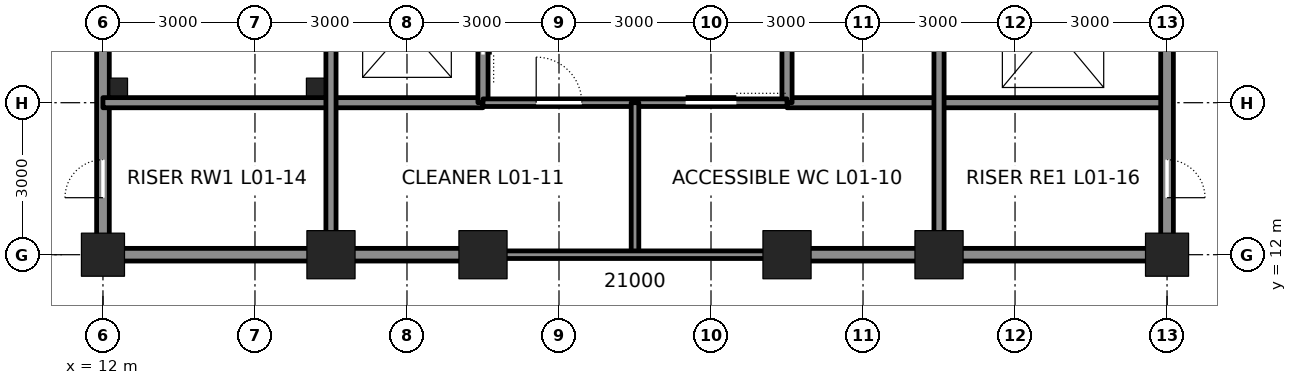
"""IFC4 building model, lengths in metres.
Left out: names, types, materials, properties, quantities, classifications, styles, units other than length and angle.
Written with IfcOpenShell. Run it as: python <this file> out.ifc"""

import sys

from ifc_helpers import new_model, si_unit, direction, frame, frame_2d, origin, origin_2d, place, context, subcontext, project, spatial, rectangle, hollow_rectangle, extrude, element, fill, save


model = new_model("IFC4")
c1 = context("Model", 3, precision=1e-05, world=origin(), true_north=direction((0.0, 1.0)))
c2 = subcontext(c1, "Body", "Model", "MODEL_VIEW")
j1 = project(units=[si_unit("LENGTHUNIT", "METRE"), si_unit("PLANEANGLEUNIT", "RADIAN")], contexts=[c1])
p1 = place(None, origin())
s1 = spatial("IfcSite", under=j1, at=p1, CompositionType="ELEMENT")
p2 = place(p1, origin())
s2 = spatial("IfcBuilding", under=s1, at=p2, CompositionType="ELEMENT")
p3 = place(p2, frame((0.0, 0.0, 6.0)))
s3 = spatial("IfcBuildingStorey", under=s2, at=p3, CompositionType="ELEMENT", Elevation=6.0)
p4 = place(p3, frame((12.0, 12.0, 0.0), z_axis=(0.0, 0.0, 1.0), x_axis=(1.0, 0.0, 0.0)))
e1 = element("IfcColumn", 1, at=p4, inside=s3, PredefinedType="COLUMN", context=c2, shape_type="SweptSolid", body=[
    extrude(hollow_rectangle(XDim=0.85, YDim=0.85, WallThickness=0.085, at=origin_2d()), origin(), (0.0, 0.0, 1.0), 7.5),
])
for number, where, z_axis, x_axis in (
    (2, (16.5, 12.0, 0.0), (0.0, 0.0, 1.0), (1.0, 0.0, 0.0)),
    (3, (19.5, 12.0, 0.0), (0.0, 0.0, 1.0), (1.0, 0.0, 0.0)),
    (4, (25.5, 12.0, 0.0), (0.0, 0.0, 1.0), (1.0, 0.0, 0.0)),
    (5, (28.5, 12.0, 0.0), (0.0, 0.0, 1.0), (1.0, 0.0, 0.0)),
):
    element("IfcColumn", number, at=place(p3, frame(where, z_axis=z_axis, x_axis=x_axis)), inside=s3, PredefinedType="COLUMN", context=c2, shape_type="SweptSolid", body=[
        extrude(hollow_rectangle(XDim=0.95, YDim=0.95, WallThickness=0.095, at=origin_2d()), origin(), (0.0, 0.0, 1.0), 7.5),
    ])
p5 = place(p3, frame((33.0, 12.0, 0.0), z_axis=(0.0, 0.0, 1.0), x_axis=(1.0, 0.0, 0.0)))
e6 = element("IfcColumn", 6, at=p5, inside=s3, PredefinedType="COLUMN", context=c2, shape_type="SweptSolid", body=[
    extrude(hollow_rectangle(XDim=0.85, YDim=0.85, WallThickness=0.085, at=origin_2d()), origin(), (0.0, 0.0, 1.0), 7.5),
])
p6 = place(p3, frame((12.0, 12.25, 0.0), z_axis=(0.0, 0.0, 1.0), x_axis=(0.0, 1.0, 0.0)))
e7 = element("IfcWall", 7, at=p6, inside=s3, PredefinedType="SOLIDWALL", context=c2, shape_type="SweptSolid", body=[
    extrude(rectangle(XDim=8.5, YDim=0.25, at=frame_2d((4.25, 0.0))), origin(), (0.0, 0.0, 1.0), 6.373),
])
p7 = place(p6, frame((0.875, 0.0, 0.0)))
e8 = element("IfcOpeningElement", 8, at=p7, cuts=e7, PredefinedType="OPENING", context=c2, shape_type="SweptSolid", body=[
    extrude(rectangle(XDim=0.75, YDim=2.1, at=frame_2d((0.375, 1.05))), frame((0.0, 0.135, 0.0), z_axis=(0.0, -1.0, 0.0), x_axis=(1.0, 0.0, 0.0)), (0.0, 0.0, 1.0), 0.27),
])
p8 = place(p3, frame((12.25, 12.0, 0.0), z_axis=(0.0, 0.0, 1.0), x_axis=(1.0, 0.0, 0.0)))
e9 = element("IfcWall", 9, at=p8, inside=s3, PredefinedType="SOLIDWALL", context=c2, shape_type="SweptSolid", body=[
    extrude(rectangle(XDim=4.0, YDim=0.25, at=frame_2d((2.0, 0.0))), origin(), (0.0, 0.0, 1.0), 6.441),
])
for number, where, z_axis, x_axis in (
    (10, (16.75, 12.0, 0.0), (0.0, 0.0, 1.0), (1.0, 0.0, 0.0)),
    (11, (25.75, 12.0, 0.0), (0.0, 0.0, 1.0), (1.0, 0.0, 0.0)),
):
    element("IfcWall", number, at=place(p3, frame(where, z_axis=z_axis, x_axis=x_axis)), inside=s3, PredefinedType="SOLIDWALL", context=c2, shape_type="SweptSolid", body=[
        extrude(rectangle(XDim=2.5, YDim=0.25, at=frame_2d((1.25, 0.0))), origin(), (0.0, 0.0, 1.0), 6.441),
    ])
p9 = place(p3, frame((28.75, 12.0, 0.0), z_axis=(0.0, 0.0, 1.0), x_axis=(1.0, 0.0, 0.0)))
e12 = element("IfcWall", 12, at=p9, inside=s3, PredefinedType="SOLIDWALL", context=c2, shape_type="SweptSolid", body=[
    extrude(rectangle(XDim=4.0, YDim=0.25, at=frame_2d((2.0, 0.0))), origin(), (0.0, 0.0, 1.0), 6.441),
])
for number, where, z_axis, x_axis in (
    (13, (12.0, 15.0, 0.0), (0.0, 0.0, 1.0), (1.0, 0.0, 0.0)),
    (14, (25.5, 15.0, 0.0), (0.0, 0.0, 1.0), (1.0, 0.0, 0.0)),
):
    element("IfcWall", number, at=place(p3, frame(where, z_axis=z_axis, x_axis=x_axis)), inside=s3, PredefinedType="SOLIDWALL", context=c2, shape_type="SweptSolid", body=[
        extrude(rectangle(XDim=7.5, YDim=0.2, at=frame_2d((3.75, 0.0))), origin(), (0.0, 0.0, 1.0), 7.3),
    ])
p10 = place(p3, frame((16.5, 12.25, 0.0), z_axis=(0.0, 0.0, 1.0), x_axis=(0.0, 1.0, 0.0)))
e15 = element("IfcWall", 15, at=p10, inside=s3, PredefinedType="SOLIDWALL", context=c2, shape_type="SweptSolid", body=[
    extrude(rectangle(XDim=8.5, YDim=0.2, at=frame_2d((4.25, 0.0))), origin(), (0.0, 0.0, 1.0), 6.373),
])
p11 = place(p3, frame((19.5, 15.0, 0.0), z_axis=(0.0, 0.0, 1.0), x_axis=(0.0, 1.0, 0.0)))
e16 = element("IfcWall", 16, at=p11, inside=s3, PredefinedType="SOLIDWALL", context=c2, shape_type="SweptSolid", body=[
    extrude(rectangle(XDim=12.0, YDim=0.2, at=frame_2d((6.0, 0.0))), origin(), (0.0, 0.0, 1.0), 6.325),
])
p12 = place(p11, frame((0.95, 0.0, 0.0)))
e17 = element("IfcOpeningElement", 17, at=p12, cuts=e16, PredefinedType="OPENING", context=c2, shape_type="SweptSolid", body=[
    extrude(rectangle(XDim=1.1, YDim=2.1, at=frame_2d((0.55, 1.05))), frame((0.0, 0.11, 0.0), z_axis=(0.0, -1.0, 0.0), x_axis=(1.0, 0.0, 0.0)), (0.0, 0.0, 1.0), 0.22),
])
p13 = place(p11, frame((3.95, 0.0, 0.0)))
e18 = element("IfcOpeningElement", 18, at=p13, cuts=e16, PredefinedType="OPENING", context=c2, shape_type="SweptSolid", body=[
    extrude(rectangle(XDim=1.1, YDim=2.1, at=frame_2d((0.55, 1.05))), frame((0.0, 0.11, 0.0), z_axis=(0.0, -1.0, 0.0), x_axis=(1.0, 0.0, 0.0)), (0.0, 0.0, 1.0), 0.22),
])
p14 = place(p11, frame((6.95, 0.0, 0.0)))
e19 = element("IfcOpeningElement", 19, at=p14, cuts=e16, PredefinedType="OPENING", context=c2, shape_type="SweptSolid", body=[
    extrude(rectangle(XDim=1.1, YDim=2.1, at=frame_2d((0.55, 1.05))), frame((0.0, 0.11, 0.0), z_axis=(0.0, -1.0, 0.0), x_axis=(1.0, 0.0, 0.0)), (0.0, 0.0, 1.0), 0.22),
])
p15 = place(p11, frame((9.95, 0.0, 0.0)))
e20 = element("IfcOpeningElement", 20, at=p15, cuts=e16, PredefinedType="OPENING", context=c2, shape_type="SweptSolid", body=[
    extrude(rectangle(XDim=1.1, YDim=2.1, at=frame_2d((0.55, 1.05))), frame((0.0, 0.11, 0.0), z_axis=(0.0, -1.0, 0.0), x_axis=(1.0, 0.0, 0.0)), (0.0, 0.0, 1.0), 0.22),
])
p16 = place(p3, frame((25.5, 15.0, 0.0), z_axis=(0.0, 0.0, 1.0), x_axis=(0.0, 1.0, 0.0)))
e21 = element("IfcWall", 21, at=p16, inside=s3, PredefinedType="SOLIDWALL", context=c2, shape_type="SweptSolid", body=[
    extrude(rectangle(XDim=12.0, YDim=0.2, at=frame_2d((6.0, 0.0))), origin(), (0.0, 0.0, 1.0), 6.325),
])
p17 = place(p3, frame((28.5, 12.25, 0.0), z_axis=(0.0, 0.0, 1.0), x_axis=(0.0, 1.0, 0.0)))
e22 = element("IfcWall", 22, at=p17, inside=s3, PredefinedType="SOLIDWALL", context=c2, shape_type="SweptSolid", body=[
    extrude(rectangle(XDim=8.5, YDim=0.2, at=frame_2d((4.25, 0.0))), origin(), (0.0, 0.0, 1.0), 6.373),
])
p18 = place(p3, frame((33.0, 12.25, 0.0), z_axis=(0.0, 0.0, 1.0), x_axis=(0.0, 1.0, 0.0)))
e23 = element("IfcWall", 23, at=p18, inside=s3, PredefinedType="SOLIDWALL", context=c2, shape_type="SweptSolid", body=[
    extrude(rectangle(XDim=8.5, YDim=0.25, at=frame_2d((4.25, 0.0))), origin(), (0.0, 0.0, 1.0), 6.373),
])
p19 = place(p18, frame((6.65, 0.0, 0.0)))
e24 = element("IfcOpeningElement", 24, at=p19, cuts=e23, PredefinedType="OPENING", context=c2, shape_type="SweptSolid", body=[
    extrude(rectangle(XDim=1.2, YDim=2.1, at=frame_2d((0.6, 1.05))), frame((0.0, 0.135, 0.0), z_axis=(0.0, -1.0, 0.0), x_axis=(1.0, 0.0, 0.0)), (0.0, 0.0, 1.0), 0.27),
])
p20 = place(p18, frame((0.875, 0.0, 0.0)))
e25 = element("IfcOpeningElement", 25, at=p20, cuts=e23, PredefinedType="OPENING", context=c2, shape_type="SweptSolid", body=[
    extrude(rectangle(XDim=0.75, YDim=2.1, at=frame_2d((0.375, 1.05))), frame((0.0, 0.135, 0.0), z_axis=(0.0, -1.0, 0.0), x_axis=(1.0, 0.0, 0.0)), (0.0, 0.0, 1.0), 0.27),
])
p21 = place(p3, frame((19.5, 15.0, 0.0), z_axis=(0.0, 0.0, 1.0), x_axis=(1.0, 0.0, 0.0)))
e26 = element("IfcWall", 26, at=p21, inside=s3, PredefinedType="PARTITIONING", context=c2, shape_type="SweptSolid", body=[
    extrude(rectangle(XDim=6.0, YDim=0.15, at=frame_2d((3.0, 0.0))), origin(), (0.0, 0.0, 1.0), 7.3),
])
p22 = place(p21, frame((4.0, 0.0, 0.0)))
e27 = element("IfcOpeningElement", 27, at=p22, cuts=e26, PredefinedType="OPENING", context=c2, shape_type="SweptSolid", body=[
    extrude(rectangle(XDim=1.0, YDim=2.1, at=frame_2d((0.5, 1.05))), frame((0.0, 0.085, 0.0), z_axis=(0.0, -1.0, 0.0), x_axis=(1.0, 0.0, 0.0)), (0.0, 0.0, 1.0), 0.17),
])
p23 = place(p21, frame((1.05, 0.0, 0.0)))
e28 = element("IfcOpeningElement", 28, at=p23, cuts=e26, PredefinedType="OPENING", context=c2, shape_type="SweptSolid", body=[
    extrude(rectangle(XDim=0.9, YDim=2.1, at=frame_2d((0.45, 1.05))), frame((0.0, 0.085, 0.0), z_axis=(0.0, -1.0, 0.0), x_axis=(1.0, 0.0, 0.0)), (0.0, 0.0, 1.0), 0.17),
])
p24 = place(p3, frame((22.5, 15.0, 0.0), z_axis=(0.0, 0.0, 1.0), x_axis=(0.0, -1.0, 0.0)))
e29 = element("IfcWall", 29, at=p24, inside=s3, PredefinedType="PARTITIONING", context=c2, shape_type="SweptSolid", body=[
    extrude(rectangle(XDim=3.0, YDim=0.15, at=frame_2d((1.5, 0.0))), origin(), (0.0, 0.0, 1.0), 7.3),
])
p25 = place(p3, frame((19.5, 12.0, 0.0), z_axis=(0.0, 0.0, 1.0), x_axis=(1.0, 0.0, 0.0)))
e30 = element("IfcWall", 30, at=p25, inside=s3, PredefinedType="PARTITIONING", context=c2, shape_type="SweptSolid", body=[
    extrude(rectangle(XDim=6.0, YDim=0.15, at=frame_2d((3.0, 0.0))), origin(), (0.0, 0.0, 1.0), 6.441),
])
for number, where, z_axis, x_axis in (
    (31, (12.31, 15.31, 0.0), (0.0, 0.0, 1.0), (1.0, 0.0, 0.0)),
    (32, (16.19, 15.31, 0.0), (0.0, 0.0, 1.0), (1.0, 0.0, 0.0)),
):
    element("IfcColumn", number, at=place(p3, frame(where, z_axis=z_axis, x_axis=x_axis)), inside=s3, PredefinedType="COLUMN", context=c2, shape_type="SweptSolid", body=[
        extrude(hollow_rectangle(XDim=0.35, YDim=0.35, WallThickness=0.035, at=origin_2d()), origin(), (0.0, 0.0, 1.0), 7.5),
    ])
p26 = place(p7, origin())
e33 = element("IfcDoor", 33, at=p26, inside=s3, OperationType="SINGLE_SWING_LEFT", PredefinedType="DOOR", context=c2, shape_type="SweptSolid", body=[
    extrude(rectangle(XDim=0.75, YDim=2.1, at=frame_2d((0.375, 1.05))), frame((0.0, 0.025, 0.0), z_axis=(0.0, -1.0, 0.0), x_axis=(1.0, 0.0, 0.0)), (0.0, 0.0, 1.0), 0.05),
])
fill(e8, e33)
p27 = place(p20, frame((0.75, 0.0, 0.0), z_axis=(0.0, 0.0, 1.0), x_axis=(-1.0, 0.0, 0.0)))
e34 = element("IfcDoor", 34, at=p27, inside=s3, OperationType="SINGLE_SWING_RIGHT", PredefinedType="DOOR", context=c2, shape_type="SweptSolid", body=[
    extrude(rectangle(XDim=0.75, YDim=2.1, at=frame_2d((0.375, 1.05))), frame((0.0, 0.025, 0.0), z_axis=(0.0, -1.0, 0.0), x_axis=(1.0, 0.0, 0.0)), (0.0, 0.0, 1.0), 0.05),
])
fill(e25, e34)
p28 = place(p22, origin())
e35 = element("IfcDoor", 35, at=p28, inside=s3, OperationType="SLIDING_TO_LEFT", PredefinedType="DOOR", context=c2, shape_type="SweptSolid", body=[
    extrude(rectangle(XDim=1.0, YDim=2.1, at=frame_2d((0.5, 1.05))), frame((0.0, 0.025, 0.0), z_axis=(0.0, -1.0, 0.0), x_axis=(1.0, 0.0, 0.0)), (0.0, 0.0, 1.0), 0.05),
])
fill(e27, e35)
p29 = place(p23, origin())
e36 = element("IfcDoor", 36, at=p29, inside=s3, OperationType="SINGLE_SWING_LEFT", PredefinedType="DOOR", context=c2, shape_type="SweptSolid", body=[
    extrude(rectangle(XDim=0.9, YDim=2.1, at=frame_2d((0.45, 1.05))), frame((0.0, 0.025, 0.0), z_axis=(0.0, -1.0, 0.0), x_axis=(1.0, 0.0, 0.0)), (0.0, 0.0, 1.0), 0.05),
])
fill(e28, e36)
p30 = place(p12, origin())
e37 = element("IfcDoor", 37, at=p30, inside=s3, OperationType="DOUBLE_DOOR_SLIDING", PredefinedType="DOOR", context=c2, shape_type="SweptSolid", body=[
    extrude(rectangle(XDim=1.1, YDim=2.1, at=frame_2d((0.55, 1.05))), frame((0.0, 0.025, 0.0), z_axis=(0.0, -1.0, 0.0), x_axis=(1.0, 0.0, 0.0)), (0.0, 0.0, 1.0), 0.05),
])
fill(e17, e37)
save(model, sys.argv[1])
